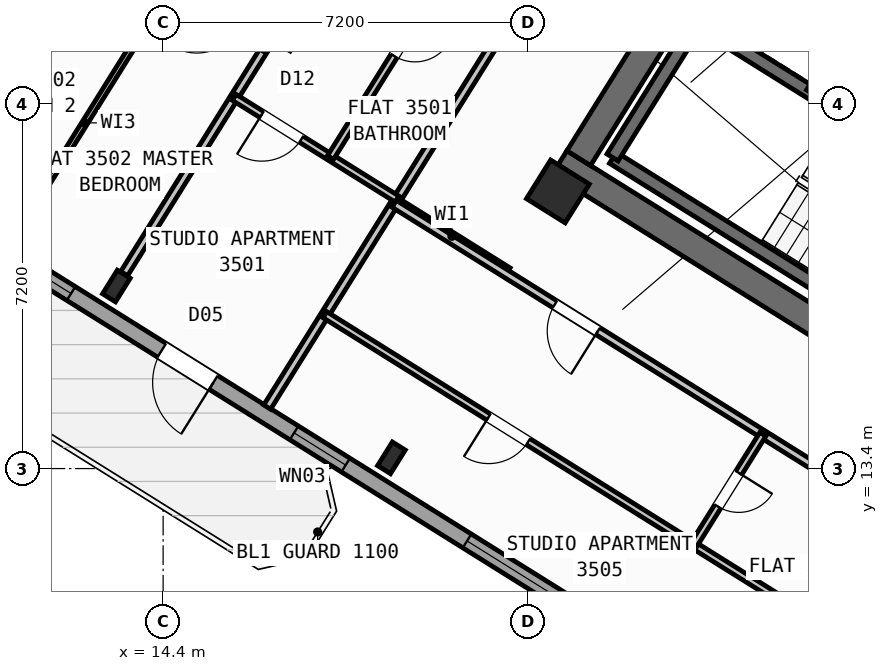
"""IFC4 building model, lengths in metres.
Left out: names, types, materials, properties, quantities, classifications, styles, units other than length and angle.
Written with IfcOpenShell. Run it as: python <this file> out.ifc"""

import sys

from ifc_helpers import new_model, si_unit, direction, frame, frame_2d, origin, origin_2d, place, context, subcontext, project, spatial, rectangle, hollow_rectangle, i_section, extrude, source, transform, mapped, element, fill, save


model = new_model("IFC4")
c1 = context("Model", 3, precision=1e-05, world=origin(), true_north=direction((0.0, 1.0)))
c2 = subcontext(c1, "Body", "Model", "MODEL_VIEW")
j1 = project(units=[si_unit("LENGTHUNIT", "METRE"), si_unit("PLANEANGLEUNIT", "RADIAN")], contexts=[c1])
p1 = place(None, origin())
s1 = spatial("IfcSite", under=j1, at=p1, CompositionType="ELEMENT")
p2 = place(p1, origin())
s2 = spatial("IfcBuilding", under=s1, at=p2, CompositionType="ELEMENT")
p3 = place(p2, frame((0.0, 0.0, 140.7)))
s3 = spatial("IfcBuildingStorey", under=s2, at=p3, CompositionType="ELEMENT", Elevation=140.7)
p4 = place(p3, frame((33.366, 12.477, 0.0), z_axis=(0.0, 0.0, 1.0), x_axis=(-0.848047359947, 0.529920442413, 0.0)))
e1 = element("IfcWall", 1, at=p4, inside=s3, PredefinedType="SHEAR", context=c2, shape_type="SweptSolid", body=[
    extrude(rectangle(XDim=13.14, YDim=0.55, at=frame_2d((6.57, 0.0))), origin(), (0.0, 0.0, 1.0), 3.35),
])
p5 = place(p3, frame((26.007, 24.976, 0.0), z_axis=(0.0, 0.0, 1.0), x_axis=(-0.529923795287, -0.848045264823, 0.0)))
e2 = element("IfcWall", 2, at=p5, inside=s3, PredefinedType="SHEAR", context=c2, shape_type="SweptSolid", body=[
    extrude(rectangle(XDim=6.425, YDim=0.55, at=frame_2d((3.212, 0.0))), origin(), (0.0, 0.0, 1.0), 3.35),
])
m1 = source(origin(), c2, "Body", "SweptSolid", [
    extrude(hollow_rectangle(XDim=0.9, YDim=0.9, WallThickness=0.036, at=origin_2d()), origin(), (0.0, 0.0, 1.0), 3.6),
])
p6 = place(p3, frame((22.191, 18.87, 0.0), z_axis=(0.0, 0.0, 1.0), x_axis=(-0.848048096156, 0.529919264233, 0.0)))
e3 = element("IfcColumn", 3, at=p6, inside=s3, PredefinedType="COLUMN", context=c2, shape_type="MappedRepresentation", body=[
    mapped(m1, transform((0.0, 0.0, 0.0), scale=1.0)),
])
m2 = source(origin(), c2, "Body", "SweptSolid", [
    extrude(i_section(OverallWidth=0.3, OverallDepth=0.55, WebThickness=0.015, FlangeThickness=0.029, at=origin_2d()), origin(), (0.0, 0.0, 1.0), 3.6),
])
for number, where, z_axis, x_axis in (
    (4, (18.906, 13.612, 0.0), (0.0, 0.0, 1.0), (-0.848, 0.53, 0.0)),
    (5, (13.478, 17.003, 0.0), (0.0, 0.0, 1.0), (-0.848, 0.53, 0.0)),
):
    element("IfcColumn", number, at=place(p3, frame(where, z_axis=z_axis, x_axis=x_axis)), inside=s3, PredefinedType="COLUMN", context=c2, shape_type="MappedRepresentation", body=[
        mapped(m2, transform((0.0, 0.0, 0.0), scale=1.0)),
    ])
p7 = place(p3, frame((29.268, 6.429, 0.0), z_axis=(0.0, 0.0, 1.0), x_axis=(-0.848049971435, 0.529916263149, 0.0)))
e6 = element("IfcWall", 6, at=p7, inside=s3, PredefinedType="STANDARD", context=c2, shape_type="SweptSolid", body=[
    extrude(rectangle(XDim=31.588, YDim=0.32, at=frame_2d((15.794, 0.0))), origin(), (0.0, 0.0, 1.0), 3.35),
])
p8 = place(p7, frame((16.362, 0.0, 0.0)))
e7 = element("IfcOpeningElement", 7, at=p8, cuts=e6, PredefinedType="OPENING", context=c2, shape_type="SweptSolid", body=[
    extrude(rectangle(XDim=1.2, YDim=2.15, at=frame_2d((0.6, 1.075))), frame((0.0, 0.17, 0.0), z_axis=(0.0, -1.0, 0.0), x_axis=(1.0, 0.0, 0.0)), (0.0, 0.0, 1.0), 0.34),
])
p9 = place(p7, frame((2.989, 0.0, 0.8)))
e8 = element("IfcOpeningElement", 8, at=p9, cuts=e6, PredefinedType="OPENING", context=c2, shape_type="SweptSolid", body=[
    extrude(rectangle(XDim=2.1, YDim=1.55, at=frame_2d((1.05, 0.775))), frame((0.0, 0.17, 0.0), z_axis=(0.0, -1.0, 0.0), x_axis=(1.0, 0.0, 0.0)), (0.0, 0.0, 1.0), 0.34),
])
p10 = place(p7, frame((8.359, 0.0, 0.8)))
e9 = element("IfcOpeningElement", 9, at=p10, cuts=e6, PredefinedType="OPENING", context=c2, shape_type="SweptSolid", body=[
    extrude(rectangle(XDim=2.1, YDim=1.55, at=frame_2d((1.05, 0.775))), frame((0.0, 0.17, 0.0), z_axis=(0.0, -1.0, 0.0), x_axis=(1.0, 0.0, 0.0)), (0.0, 0.0, 1.0), 0.34),
])
p11 = place(p7, frame((13.284, 0.0, 0.95)))
e10 = element("IfcOpeningElement", 10, at=p11, cuts=e6, PredefinedType="OPENING", context=c2, shape_type="SweptSolid", body=[
    extrude(rectangle(XDim=1.2, YDim=1.4, at=frame_2d((0.6, 0.7))), frame((0.0, 0.17, 0.0), z_axis=(0.0, -1.0, 0.0), x_axis=(1.0, 0.0, 0.0)), (0.0, 0.0, 1.0), 0.34),
])
p12 = place(p7, frame((29.188, 0.0, 0.95)))
e11 = element("IfcOpeningElement", 11, at=p12, cuts=e6, PredefinedType="OPENING", context=c2, shape_type="SweptSolid", body=[
    extrude(rectangle(XDim=1.2, YDim=1.4, at=frame_2d((0.6, 0.7))), frame((0.0, 0.17, 0.0), z_axis=(0.0, -1.0, 0.0), x_axis=(1.0, 0.0, 0.0)), (0.0, 0.0, 1.0), 0.34),
])
p13 = place(p7, frame((19.674, 0.0, 1.0)))
e12 = element("IfcOpeningElement", 12, at=p13, cuts=e6, PredefinedType="OPENING", context=c2, shape_type="SweptSolid", body=[
    extrude(rectangle(XDim=0.9, YDim=1.25, at=frame_2d((0.45, 0.625))), frame((0.0, 0.17, 0.0), z_axis=(0.0, -1.0, 0.0), x_axis=(1.0, 0.0, 0.0)), (0.0, 0.0, 1.0), 0.34),
])
p14 = place(p7, frame((21.896, 0.0, 1.0)))
e13 = element("IfcOpeningElement", 13, at=p14, cuts=e6, PredefinedType="OPENING", context=c2, shape_type="SweptSolid", body=[
    extrude(rectangle(XDim=0.9, YDim=1.25, at=frame_2d((0.45, 0.625))), frame((0.0, 0.17, 0.0), z_axis=(0.0, -1.0, 0.0), x_axis=(1.0, 0.0, 0.0)), (0.0, 0.0, 1.0), 0.34),
])
p15 = place(p7, frame((24.106, 0.0, 1.0)))
e14 = element("IfcOpeningElement", 14, at=p15, cuts=e6, PredefinedType="OPENING", context=c2, shape_type="SweptSolid", body=[
    extrude(rectangle(XDim=0.65, YDim=1.15, at=frame_2d((0.325, 0.575))), frame((0.0, 0.17, 0.0), z_axis=(0.0, -1.0, 0.0), x_axis=(1.0, 0.0, 0.0)), (0.0, 0.0, 1.0), 0.34),
])
p16 = place(p7, frame((26.366, 0.0, 1.0)))
e15 = element("IfcOpeningElement", 15, at=p16, cuts=e6, PredefinedType="OPENING", context=c2, shape_type="SweptSolid", body=[
    extrude(rectangle(XDim=0.9, YDim=1.25, at=frame_2d((0.45, 0.625))), frame((0.0, 0.17, 0.0), z_axis=(0.0, -1.0, 0.0), x_axis=(1.0, 0.0, 0.0)), (0.0, 0.0, 1.0), 0.34),
])
p17 = place(p3, frame((29.605, 15.581, 0.0), z_axis=(0.0, 0.0, 1.0), x_axis=(-0.848036911448, 0.529937163087, 0.0)))
e16 = element("IfcWall", 16, at=p17, inside=s3, PredefinedType="SHEAR", context=c2, shape_type="SweptSolid", body=[
    extrude(rectangle(XDim=7.46, YDim=0.26, at=frame_2d((3.73, 0.0))), origin(), (0.0, 0.0, 1.0), 3.35),
])
p18 = place(p3, frame((31.28, 18.261, 0.0), z_axis=(0.0, 0.0, 1.0), x_axis=(-0.848051618787, 0.529913626805, 0.0)))
e17 = element("IfcWall", 17, at=p18, inside=s3, PredefinedType="SHEAR", context=c2, shape_type="SweptSolid", body=[
    extrude(rectangle(XDim=7.46, YDim=0.26, at=frame_2d((3.73, 0.0))), origin(), (0.0, 0.0, 1.0), 3.35),
])
p19 = place(p18, frame((0.36, 0.0, 0.0)))
e18 = element("IfcOpeningElement", 18, at=p19, cuts=e17, PredefinedType="OPENING", context=c2, shape_type="SweptSolid", body=[
    extrude(rectangle(XDim=0.86, YDim=2.05, at=frame_2d((0.43, 1.025))), frame((0.0, 0.14, 0.0), z_axis=(0.0, -1.0, 0.0), x_axis=(1.0, 0.0, 0.0)), (0.0, 0.0, 1.0), 0.28),
])
p20 = place(p3, frame((24.945, 22.22, 0.0), z_axis=(0.0, 0.0, 1.0), x_axis=(-0.529908658664, -0.84805472316, 0.0)))
e19 = element("IfcWall", 19, at=p20, inside=s3, PredefinedType="SHEAR", context=c2, shape_type="SweptSolid", body=[
    extrude(rectangle(XDim=3.16, YDim=0.26, at=frame_2d((1.58, 0.0))), origin(), (0.0, 0.0, 1.0), 3.35),
])
p21 = place(p3, frame((28.71, 23.263, 0.0), z_axis=(0.0, 0.0, 1.0), x_axis=(-0.529907497854, -0.848055448493, 0.0)))
e20 = element("IfcWall", 20, at=p21, inside=s3, PredefinedType="STANDARD", context=c2, shape_type="SweptSolid", body=[
    extrude(rectangle(XDim=2.88, YDim=0.2, at=frame_2d((1.44, 0.0))), origin(), (0.0, 0.0, 1.0), 3.34),
])
p22 = place(p3, frame((31.525, 21.504, 0.0), z_axis=(0.0, 0.0, 1.0), x_axis=(-0.848040211232, 0.529931882541, 0.0)))
e21 = element("IfcWall", 21, at=p22, inside=s3, PredefinedType="STANDARD", context=c2, shape_type="SweptSolid", body=[
    extrude(rectangle(XDim=6.218, YDim=0.2, at=frame_2d((3.109, 0.0))), origin(), (0.0, 0.0, 1.0), 3.34),
])
p23 = place(p22, frame((4.4, 0.0, 0.0)))
e22 = element("IfcOpeningElement", 22, at=p23, cuts=e21, PredefinedType="OPENING", context=c2, shape_type="SweptSolid", body=[
    extrude(rectangle(XDim=0.86, YDim=2.05, at=frame_2d((0.43, 1.025))), frame((0.0, 0.11, 0.0), z_axis=(0.0, -1.0, 0.0), x_axis=(1.0, 0.0, 0.0)), (0.0, 0.0, 1.0), 0.22),
])
p24 = place(p22, frame((1.45, 0.0, 0.0)))
e23 = element("IfcOpeningElement", 23, at=p24, cuts=e21, PredefinedType="OPENING", context=c2, shape_type="SweptSolid", body=[
    extrude(rectangle(XDim=0.86, YDim=2.05, at=frame_2d((0.43, 1.025))), frame((0.0, 0.11, 0.0), z_axis=(0.0, -1.0, 0.0), x_axis=(1.0, 0.0, 0.0)), (0.0, 0.0, 1.0), 0.22),
])
p25 = place(p3, frame((21.206, 17.292, 0.0), z_axis=(0.0, 0.0, 1.0), x_axis=(-0.848050851465, 0.529914854792, 0.0)))
e24 = element("IfcWall", 24, at=p25, inside=s3, PredefinedType="PARTITIONING", context=c2, shape_type="SweptSolid", body=[
    extrude(rectangle(XDim=2.61, YDim=0.16, at=frame_2d((1.305, 0.0))), origin(), (0.0, 0.0, 1.0), 3.34),
])
p26 = place(p3, frame((21.938, 23.391, 0.0), z_axis=(0.0, 0.0, 1.0), x_axis=(-0.529924725692, -0.848044683434, 0.0)))
e25 = element("IfcWall", 25, at=p26, inside=s3, PredefinedType="PARTITIONING", context=c2, shape_type="SweptSolid", body=[
    extrude(rectangle(XDim=10.35, YDim=0.16, at=frame_2d((5.175, 0.0))), origin(), (0.0, 0.0, 1.0), 3.34),
])
p27 = place(p3, frame((16.519, 21.87, 0.0), z_axis=(0.0, 0.0, 1.0), x_axis=(-0.529922447305, -0.848046107144, 0.0)))
e26 = element("IfcWall", 26, at=p27, inside=s3, PredefinedType="PARTITIONING", context=c2, shape_type="SweptSolid", body=[
    extrude(rectangle(XDim=5.451, YDim=0.16, at=frame_2d((2.726, 0.0))), origin(), (0.0, 0.0, 1.0), 2.775),
])
p28 = place(p3, frame((19.019, 18.718, 0.0), z_axis=(0.0, 0.0, 1.0), x_axis=(-0.848059820872, 0.529900500304, 0.0)))
e27 = element("IfcWall", 27, at=p28, inside=s3, PredefinedType="PLUMBINGWALL", context=c2, shape_type="SweptSolid", body=[
    extrude(rectangle(XDim=3.79, YDim=0.14, at=frame_2d((1.895, 0.0))), origin(), (0.0, 0.0, 1.0), 3.34),
])
p29 = place(p28, frame((2.23, 0.0, 0.0)))
e28 = element("IfcOpeningElement", 28, at=p29, cuts=e27, PredefinedType="OPENING", context=c2, shape_type="SweptSolid", body=[
    extrude(rectangle(XDim=0.92, YDim=2.08, at=frame_2d((0.46, 1.04))), frame((0.0, 0.08, 0.0), z_axis=(0.0, -1.0, 0.0), x_axis=(1.0, 0.0, 0.0)), (0.0, 0.0, 1.0), 0.16),
])
p30 = place(p3, frame((20.624, 24.212, 0.0), z_axis=(0.0, 0.0, 1.0), x_axis=(-0.529919283494, -0.848048084121, 0.0)))
e29 = element("IfcWall", 29, at=p30, inside=s3, PredefinedType="PLUMBINGWALL", context=c2, shape_type="SweptSolid", body=[
    extrude(rectangle(XDim=5.51, YDim=0.14, at=frame_2d((2.755, 0.0))), origin(), (0.0, 0.0, 1.0), 2.995),
])
p31 = place(p30, frame((2.365, 0.0, 0.0)))
e30 = element("IfcOpeningElement", 30, at=p31, cuts=e29, PredefinedType="OPENING", context=c2, shape_type="SweptSolid", body=[
    extrude(rectangle(XDim=0.78, YDim=2.05, at=frame_2d((0.39, 1.025))), frame((0.0, 0.08, 0.0), z_axis=(0.0, -1.0, 0.0), x_axis=(1.0, 0.0, 0.0)), (0.0, 0.0, 1.0), 0.16),
])
for number, where, z_axis, x_axis in (
    (31, (14.508, 22.869, 0.0), (0.0, 0.0, 1.0), (-0.53, -0.848, 0.0)),
    (32, (12.613, 24.053, 0.0), (0.0, 0.0, 1.0), (-0.53, -0.848, 0.0)),
):
    element("IfcWall", number, at=place(p3, frame(where, z_axis=z_axis, x_axis=x_axis)), inside=s3, PredefinedType="PARTITIONING", context=c2, shape_type="SweptSolid", body=[
        extrude(rectangle(XDim=6.24, YDim=0.11, at=frame_2d((3.12, 0.0))), origin(), (0.0, 0.0, 1.0), 2.995),
    ])
p32 = place(p3, frame((32.164, 10.374, 0.0), z_axis=(0.0, 0.0, 1.0), x_axis=(-0.848044107957, 0.529925646633, 0.0)))
e33 = element("IfcWall", 33, at=p32, inside=s3, PredefinedType="PARTITIONING", context=c2, shape_type="SweptSolid", body=[
    extrude(rectangle(XDim=15.57, YDim=0.16, at=frame_2d((7.785, 0.0))), origin(), (0.0, 0.0, 1.0), 3.34),
])
p33 = place(p32, frame((10.83, 0.0, 0.0)))
e34 = element("IfcOpeningElement", 34, at=p33, cuts=e33, PredefinedType="OPENING", context=c2, shape_type="SweptSolid", body=[
    extrude(rectangle(XDim=1.0, YDim=2.1, at=frame_2d((0.5, 1.05))), frame((0.0, 0.09, 0.0), z_axis=(0.0, -1.0, 0.0), x_axis=(1.0, 0.0, 0.0)), (0.0, 0.0, 1.0), 0.18),
])
p34 = place(p3, frame((29.72, 8.859, 0.0), z_axis=(0.0, 0.0, 1.0), x_axis=(-0.848049134363, 0.529917602752, 0.0)))
e35 = element("IfcWall", 35, at=p34, inside=s3, PredefinedType="PLUMBINGWALL", context=c2, shape_type="SweptSolid", body=[
    extrude(rectangle(XDim=14.3, YDim=0.14, at=frame_2d((7.15, 0.0))), origin(), (0.0, 0.0, 1.0), 3.34),
])
p35 = place(p34, frame((9.57, 0.0, 0.0)))
e36 = element("IfcOpeningElement", 36, at=p35, cuts=e35, PredefinedType="OPENING", context=c2, shape_type="SweptSolid", body=[
    extrude(rectangle(XDim=0.92, YDim=2.08, at=frame_2d((0.46, 1.04))), frame((0.0, 0.08, 0.0), z_axis=(0.0, -1.0, 0.0), x_axis=(1.0, 0.0, 0.0)), (0.0, 0.0, 1.0), 0.16),
])
p36 = place(p3, frame((26.237, 14.078, 0.0), z_axis=(0.0, 0.0, 1.0), x_axis=(-0.52995640672, -0.848024885824, 0.0)))
e37 = element("IfcWall", 37, at=p36, inside=s3, PredefinedType="PLUMBINGWALL", context=c2, shape_type="SweptSolid", body=[
    extrude(rectangle(XDim=2.58, YDim=0.14, at=frame_2d((1.29, 0.0))), origin(), (0.0, 0.0, 1.0), 3.34),
])
p37 = place(p36, frame((0.9, 0.0, 0.0)))
e38 = element("IfcOpeningElement", 38, at=p37, cuts=e37, PredefinedType="OPENING", context=c2, shape_type="SweptSolid", body=[
    extrude(rectangle(XDim=0.78, YDim=2.05, at=frame_2d((0.39, 1.025))), frame((0.0, 0.08, 0.0), z_axis=(0.0, -1.0, 0.0), x_axis=(1.0, 0.0, 0.0)), (0.0, 0.0, 1.0), 0.16),
])
m3 = source(origin(), c2, "Body", "SweptSolid", [
    extrude(rectangle(XDim=1.2, YDim=2.15, at=frame_2d((0.6, 1.075))), frame((0.0, 0.025, 0.0), z_axis=(0.0, -1.0, 0.0), x_axis=(1.0, 0.0, 0.0)), (0.0, 0.0, 1.0), 0.05),
])
p38 = place(p8, origin())
e39 = element("IfcDoor", 39, at=p38, inside=s3, OperationType="SINGLE_SWING_LEFT", PredefinedType="DOOR", context=c2, shape_type="MappedRepresentation", body=[
    mapped(m3, transform((0.0, 0.0, 0.0), scale=1.0)),
])
fill(e7, e39)
m4 = source(origin(), c2, "Body", "SweptSolid", [
    extrude(rectangle(XDim=2.1, YDim=1.55, at=frame_2d((1.05, 0.775))), frame((0.0, 0.03, 0.0), z_axis=(0.0, -1.0, 0.0), x_axis=(1.0, 0.0, 0.0)), (0.0, 0.0, 1.0), 0.06),
])
p39 = place(p10, origin())
e40 = element("IfcWindow", 40, at=p39, inside=s3, PartitioningType="SINGLE_PANEL", PredefinedType="WINDOW", context=c2, shape_type="MappedRepresentation", body=[
    mapped(m4, transform((0.0, 0.0, 0.0), scale=1.0)),
])
fill(e9, e40)
m5 = source(origin(), c2, "Body", "SweptSolid", [
    extrude(rectangle(XDim=1.2, YDim=1.4, at=frame_2d((0.6, 0.7))), frame((0.0, 0.03, 0.0), z_axis=(0.0, -1.0, 0.0), x_axis=(1.0, 0.0, 0.0)), (0.0, 0.0, 1.0), 0.06),
])
p40 = place(p11, origin())
e41 = element("IfcWindow", 41, at=p40, inside=s3, PartitioningType="SINGLE_PANEL", PredefinedType="WINDOW", context=c2, shape_type="MappedRepresentation", body=[
    mapped(m5, transform((0.0, 0.0, 0.0), scale=1.0)),
])
fill(e10, e41)
m6 = source(origin(), c2, "Body", "SweptSolid", [
    extrude(rectangle(XDim=0.9, YDim=1.25, at=frame_2d((0.45, 0.625))), frame((0.0, 0.03, 0.0), z_axis=(0.0, -1.0, 0.0), x_axis=(1.0, 0.0, 0.0)), (0.0, 0.0, 1.0), 0.06),
])
p41 = place(p13, origin())
e42 = element("IfcWindow", 42, at=p41, inside=s3, PartitioningType="SINGLE_PANEL", PredefinedType="WINDOW", context=c2, shape_type="MappedRepresentation", body=[
    mapped(m6, transform((0.0, 0.0, 0.0), scale=1.0)),
])
fill(e12, e42)
m7 = source(origin(), c2, "Body", "SweptSolid", [
    extrude(rectangle(XDim=0.92, YDim=2.08, at=frame_2d((0.46, 1.04))), frame((0.0, 0.025, 0.0), z_axis=(0.0, -1.0, 0.0), x_axis=(1.0, 0.0, 0.0)), (0.0, 0.0, 1.0), 0.05),
])
p42 = place(p29, origin())
e43 = element("IfcDoor", 43, at=p42, inside=s3, OperationType="SINGLE_SWING_RIGHT", PredefinedType="DOOR", context=c2, shape_type="MappedRepresentation", body=[
    mapped(m7, transform((0.0, 0.0, 0.0), scale=1.0)),
])
fill(e28, e43)
m8 = source(origin(), c2, "Body", "SweptSolid", [
    extrude(rectangle(XDim=0.78, YDim=2.05, at=frame_2d((0.39, 1.025))), frame((0.0, 0.025, 0.0), z_axis=(0.0, -1.0, 0.0), x_axis=(1.0, 0.0, 0.0)), (0.0, 0.0, 1.0), 0.05),
])
p43 = place(p31, origin())
e44 = element("IfcDoor", 44, at=p43, inside=s3, OperationType="SINGLE_SWING_LEFT", PredefinedType="DOOR", context=c2, shape_type="MappedRepresentation", body=[
    mapped(m8, transform((0.0, 0.0, 0.0), scale=1.0)),
])
fill(e30, e44)
m9 = source(origin(), c2, "Body", "SweptSolid", [
    extrude(rectangle(XDim=1.0, YDim=2.1, at=frame_2d((0.5, 1.05))), frame((0.0, 0.025, 0.0), z_axis=(0.0, -1.0, 0.0), x_axis=(1.0, 0.0, 0.0)), (0.0, 0.0, 1.0), 0.05),
])
p44 = place(p33, origin())
e45 = element("IfcDoor", 45, at=p44, inside=s3, OperationType="SINGLE_SWING_LEFT", PredefinedType="DOOR", context=c2, shape_type="MappedRepresentation", body=[
    mapped(m9, transform((0.0, 0.0, 0.0), scale=1.0)),
])
fill(e34, e45)
p45 = place(p35, origin())
e46 = element("IfcDoor", 46, at=p45, inside=s3, OperationType="SINGLE_SWING_RIGHT", PredefinedType="DOOR", context=c2, shape_type="MappedRepresentation", body=[
    mapped(m7, transform((0.0, 0.0, 0.0), scale=1.0)),
])
fill(e36, e46)
p46 = place(p37, origin())
e47 = element("IfcDoor", 47, at=p46, inside=s3, OperationType="SINGLE_SWING_LEFT", PredefinedType="DOOR", context=c2, shape_type="MappedRepresentation", body=[
    mapped(m8, transform((0.0, 0.0, 0.0), scale=1.0)),
])
fill(e38, e47)
save(model, sys.argv[1])
